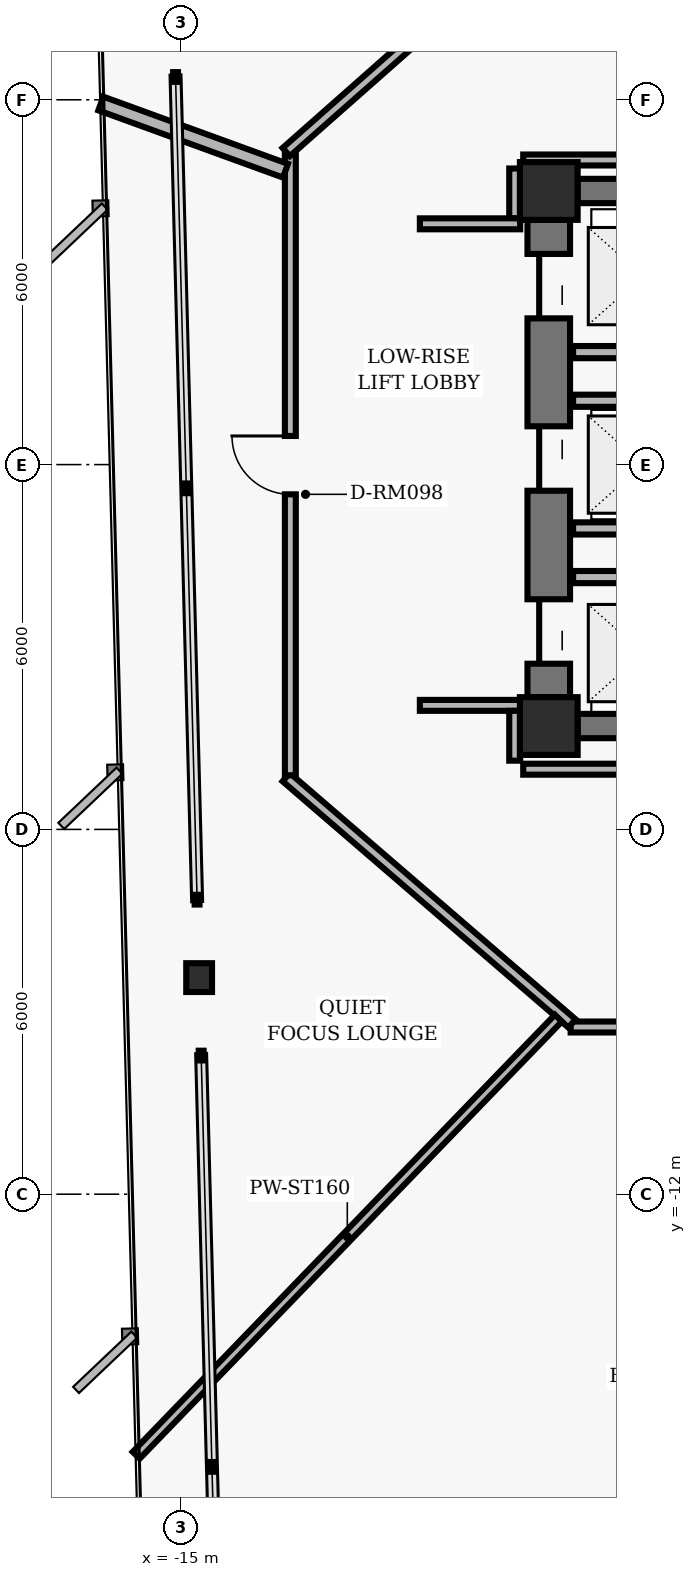
"""IFC4 building model, lengths in metres.
Left out: names, types, materials, properties, quantities, classifications, styles, units other than length and angle.
Written with IfcOpenShell. Run it as: python <this file> out.ifc"""

import sys

from ifc_helpers import new_model, si_unit, direction, frame, frame_2d, origin, origin_2d, place, context, subcontext, project, spatial, rectangle, hollow_rectangle, i_section, extrude, element, fill, save


model = new_model("IFC4")
c1 = context("Model", 3, precision=1e-05, world=origin(), true_north=direction((0.0, 1.0)))
c2 = subcontext(c1, "Body", "Model", "MODEL_VIEW")
j1 = project(units=[si_unit("LENGTHUNIT", "METRE"), si_unit("PLANEANGLEUNIT", "RADIAN")], contexts=[c1])
p1 = place(None, origin())
s1 = spatial("IfcSite", under=j1, at=p1, CompositionType="ELEMENT")
p2 = place(p1, origin())
s2 = spatial("IfcBuilding", under=s1, at=p2, CompositionType="ELEMENT")
p3 = place(p2, frame((0.0, 0.0, 42.4)))
s3 = spatial("IfcBuildingStorey", under=s2, at=p3, CompositionType="ELEMENT", Elevation=42.4)
for number, where, z_axis, x_axis in (
    (1, (-8.95, 4.5, 0.0), (0.0, 0.0, 1.0), (1.0, 0.0, 0.0)),
    (2, (-8.95, -4.3, 0.0), (0.0, 0.0, 1.0), (1.0, 0.0, 0.0)),
):
    element("IfcColumn", number, at=place(p3, frame(where, z_axis=z_axis, x_axis=x_axis)), inside=s3, PredefinedType="COLUMN", context=c2, shape_type="SweptSolid", body=[
        extrude(hollow_rectangle(XDim=0.95, YDim=0.95, WallThickness=0.06, InnerFilletRadius=0.02, OuterFilletRadius=0.04, at=origin_2d()), origin(), (0.0, 0.0, 1.0), 3.36),
    ])
p4 = place(p3, frame((-8.95, -3.825, 0.0), z_axis=(0.0, 0.0, 1.0), x_axis=(0.0, 1.0, 0.0)))
e3 = element("IfcWall", 3, at=p4, inside=s3, PredefinedType="SHEAR", context=c2, shape_type="SweptSolid", body=[
    extrude(rectangle(XDim=7.85, YDim=0.7, at=frame_2d((3.925, 0.0))), origin(), (0.0, 0.0, 1.0), 3.038),
])
p5 = place(p4, frame((0.55, 0.0, 0.0)))
e4 = element("IfcOpeningElement", 4, at=p5, cuts=e3, PredefinedType="OPENING", context=c2, shape_type="SweptSolid", body=[
    extrude(rectangle(XDim=1.06, YDim=2.04, at=frame_2d((0.53, 1.02))), frame((0.0, 0.36, 0.0), z_axis=(0.0, -1.0, 0.0), x_axis=(1.0, 0.0, 0.0)), (0.0, 0.0, 1.0), 0.72),
])
p6 = place(p4, frame((3.395, 0.0, 0.0)))
e5 = element("IfcOpeningElement", 5, at=p6, cuts=e3, PredefinedType="OPENING", context=c2, shape_type="SweptSolid", body=[
    extrude(rectangle(XDim=1.06, YDim=2.04, at=frame_2d((0.53, 1.02))), frame((0.0, 0.36, 0.0), z_axis=(0.0, -1.0, 0.0), x_axis=(1.0, 0.0, 0.0)), (0.0, 0.0, 1.0), 0.72),
])
p7 = place(p4, frame((6.23, 0.0, 0.0)))
e6 = element("IfcOpeningElement", 6, at=p7, cuts=e3, PredefinedType="OPENING", context=c2, shape_type="SweptSolid", body=[
    extrude(rectangle(XDim=1.06, YDim=2.04, at=frame_2d((0.53, 1.02))), frame((0.0, 0.36, 0.0), z_axis=(0.0, -1.0, 0.0), x_axis=(1.0, 0.0, 0.0)), (0.0, 0.0, 1.0), 0.72),
])
for number, where, z_axis, x_axis in (
    (7, (-8.475, 4.5, 0.0), (0.0, 0.0, 1.0), (1.0, 0.0, 0.0)),
    (8, (-8.475, -4.3, 0.0), (0.0, 0.0, 1.0), (1.0, 0.0, 0.0)),
):
    element("IfcWall", number, at=place(p3, frame(where, z_axis=z_axis, x_axis=x_axis)), inside=s3, PredefinedType="SHEAR", context=c2, shape_type="SweptSolid", body=[
        extrude(rectangle(XDim=1.95, YDim=0.4, at=frame_2d((0.975, 0.0))), origin(), (0.0, 0.0, 1.0), 3.038),
    ])
p8 = place(p3, frame((-14.7, -8.438, 0.0), z_axis=(0.0, 0.0, 1.0), x_axis=(1.0, 0.0, 0.0)))
e9 = element("IfcColumn", 9, at=p8, inside=s3, PredefinedType="COLUMN", context=c2, shape_type="SweptSolid", body=[
    extrude(i_section(OverallWidth=0.424, OverallDepth=0.474, WebThickness=0.048, FlangeThickness=0.077, FilletRadius=0.025, at=origin_2d()), origin(), (0.0, 0.0, 1.0), 3.36),
])
for number, where, z_axis, x_axis in (
    (10, (-8.55, -1.85, 0.0), (0.0, 0.0, 1.0), (1.0, 0.0, 0.0)),
    (11, (-8.55, 1.85, 0.0), (0.0, 0.0, 1.0), (1.0, 0.0, 0.0)),
):
    element("IfcWall", number, at=place(p3, frame(where, z_axis=z_axis, x_axis=x_axis)), inside=s3, PredefinedType="PARTITIONING", context=c2, shape_type="SweptSolid", body=[
        extrude(rectangle(XDim=2.1, YDim=0.2, at=frame_2d((1.05, 0.0))), origin(), (0.0, 0.0, 1.0), 3.013),
    ])
for number, where, z_axis, x_axis in (
    (12, (-8.55, -1.05, 0.0), (0.0, 0.0, 1.0), (1.0, 0.0, 0.0)),
    (13, (-8.55, 1.05, 0.0), (0.0, 0.0, 1.0), (1.0, 0.0, 0.0)),
):
    element("IfcWall", number, at=place(p3, frame(where, z_axis=z_axis, x_axis=x_axis)), inside=s3, PredefinedType="PARTITIONING", context=c2, shape_type="SweptSolid", body=[
        extrude(rectangle(XDim=1.91, YDim=0.2, at=frame_2d((0.955, 0.0))), origin(), (0.0, 0.0, 1.0), 3.013),
    ])
p9 = place(p3, frame((8.41, -9.25, 0.0), z_axis=(0.0, 0.0, 1.0), x_axis=(-1.0, 0.0, 0.0)))
e14 = element("IfcWall", 14, at=p9, inside=s3, PredefinedType="PARTITIONING", context=c2, shape_type="SweptSolid", body=[
    extrude(rectangle(XDim=17.0, YDim=0.18, at=frame_2d((8.5, 0.0))), origin(), (0.0, 0.0, 1.0), 2.527),
])
p10 = place(p9, frame((9.399, 0.0, 0.0)))
e15 = element("IfcOpeningElement", 15, at=p10, cuts=e14, PredefinedType="OPENING", context=c2, shape_type="SweptSolid", body=[
    extrude(rectangle(XDim=0.96, YDim=2.02, at=frame_2d((0.48, 1.01))), frame((0.0, 0.1, 0.0), z_axis=(0.0, -1.0, 0.0), x_axis=(1.0, 0.0, 0.0)), (0.0, 0.0, 1.0), 0.2),
])
p11 = place(p3, frame((-8.568, -9.191, 0.0), z_axis=(0.0, 0.0, 1.0), x_axis=(-0.757556899173, 0.652769135694, 0.0)))
e16 = element("IfcWall", 16, at=p11, inside=s3, PredefinedType="PARTITIONING", context=c2, shape_type="SweptSolid", body=[
    extrude(rectangle(XDim=6.204, YDim=0.18, at=frame_2d((3.102, 0.0))), origin(), (0.0, 0.0, 1.0), 3.013),
])
p12 = place(p3, frame((-13.2, -5.11, 0.0), z_axis=(0.0, 0.0, 1.0), x_axis=(0.0, 1.0, 0.0)))
e17 = element("IfcWall", 17, at=p12, inside=s3, PredefinedType="PARTITIONING", context=c2, shape_type="SweptSolid", body=[
    extrude(rectangle(XDim=10.22, YDim=0.18, at=frame_2d((5.11, 0.0))), origin(), (0.0, 0.0, 1.0), 2.527),
])
p13 = place(p12, frame((4.621, 0.0, 0.0)))
e18 = element("IfcOpeningElement", 18, at=p13, cuts=e17, PredefinedType="OPENING", context=c2, shape_type="SweptSolid", body=[
    extrude(rectangle(XDim=0.96, YDim=2.02, at=frame_2d((0.48, 1.01))), frame((0.0, 0.1, 0.0), z_axis=(0.0, -1.0, 0.0), x_axis=(1.0, 0.0, 0.0)), (0.0, 0.0, 1.0), 0.2),
])
p14 = place(p3, frame((-13.268, 5.14, 0.0), z_axis=(0.0, 0.0, 1.0), x_axis=(0.749626463267, 0.66186113768, 0.0)))
e19 = element("IfcWall", 19, at=p14, inside=s3, PredefinedType="PARTITIONING", context=c2, shape_type="SweptSolid", body=[
    extrude(rectangle(XDim=6.27, YDim=0.18, at=frame_2d((3.135, 0.0))), origin(), (0.0, 0.0, 1.0), 3.013),
])
p15 = place(p3, frame((-9.51, 4.87, 0.0), z_axis=(0.0, 0.0, 1.0), x_axis=(0.0, -1.0, 0.0)))
e20 = element("IfcWall", 20, at=p15, inside=s3, PredefinedType="PARTITIONING", context=c2, shape_type="SweptSolid", body=[
    extrude(rectangle(XDim=0.82, YDim=0.18, at=frame_2d((0.41, 0.0))), origin(), (0.0, 0.0, 1.0), 3.013),
])
for number, where, z_axis, x_axis in (
    (21, (-9.42, 3.96, 0.0), (0.0, 0.0, 1.0), (-1.0, 0.0, 0.0)),
    (22, (-11.07, -3.96, 0.0), (0.0, 0.0, 1.0), (1.0, 0.0, 0.0)),
):
    element("IfcWall", number, at=place(p3, frame(where, z_axis=z_axis, x_axis=x_axis)), inside=s3, PredefinedType="PARTITIONING", context=c2, shape_type="SweptSolid", body=[
        extrude(rectangle(XDim=1.65, YDim=0.18, at=frame_2d((0.825, 0.0))), origin(), (0.0, 0.0, 1.0), 3.013),
    ])
p16 = place(p3, frame((-9.51, -4.05, 0.0), z_axis=(0.0, 0.0, 1.0), x_axis=(0.0, -1.0, 0.0)))
e23 = element("IfcWall", 23, at=p16, inside=s3, PredefinedType="PARTITIONING", context=c2, shape_type="SweptSolid", body=[
    extrude(rectangle(XDim=0.82, YDim=0.18, at=frame_2d((0.41, 0.0))), origin(), (0.0, 0.0, 1.0), 2.298),
])
p17 = place(p3, frame((-9.37, -5.01, 0.0), z_axis=(0.0, 0.0, 1.0), x_axis=(1.0, 0.0, 0.0)))
e24 = element("IfcWall", 24, at=p17, inside=s3, PredefinedType="PARTITIONING", context=c2, shape_type="SweptSolid", body=[
    extrude(rectangle(XDim=3.34, YDim=0.18, at=frame_2d((1.67, 0.0))), origin(), (0.0, 0.0, 1.0), 3.013),
])
p18 = place(p3, frame((-6.562, 5.01, 0.0), z_axis=(0.0, 0.0, 1.0), x_axis=(-1.0, 0.0, 0.0)))
e25 = element("IfcWall", 25, at=p18, inside=s3, PredefinedType="PARTITIONING", context=c2, shape_type="SweptSolid", body=[
    extrude(rectangle(XDim=2.808, YDim=0.18, at=frame_2d((1.404, 0.0))), origin(), (0.0, 0.0, 1.0), 3.013),
])
p19 = place(p3, frame((-8.792, -9.104, 0.0), z_axis=(0.0, 0.0, 1.0), x_axis=(-0.694663387969, -0.719334954952, 0.0)))
e26 = element("IfcWall", 26, at=p19, inside=s3, PredefinedType="PARTITIONING", context=c2, shape_type="SweptSolid", body=[
    extrude(rectangle(XDim=9.995, YDim=0.16, at=frame_2d((4.997, 0.0))), origin(), (0.0, 0.0, 1.0), 3.013),
])
p20 = place(p3, frame((-13.28, 4.833, 0.0), z_axis=(0.0, 0.0, 1.0), x_axis=(-0.939702957278, 0.341991742712, 0.0)))
e27 = element("IfcWall", 27, at=p20, inside=s3, PredefinedType="PARTITIONING", context=c2, shape_type="SweptSolid", body=[
    extrude(rectangle(XDim=3.232, YDim=0.24, at=frame_2d((1.616, 0.0))), origin(), (0.0, 0.0, 1.0), 3.013),
])
p21 = place(p5, origin())
e28 = element("IfcDoor", 28, at=p21, inside=s3, OperationType="SLIDING_TO_LEFT", PredefinedType="DOOR", context=c2, shape_type="SweptSolid", body=[
    extrude(rectangle(XDim=1.06, YDim=2.04, at=frame_2d((0.53, 1.02))), frame((0.0, 0.025, 0.0), z_axis=(0.0, -1.0, 0.0), x_axis=(1.0, 0.0, 0.0)), (0.0, 0.0, 1.0), 0.05),
])
fill(e4, e28)
p22 = place(p6, origin())
e29 = element("IfcDoor", 29, at=p22, inside=s3, OperationType="SLIDING_TO_RIGHT", PredefinedType="DOOR", context=c2, shape_type="SweptSolid", body=[
    extrude(rectangle(XDim=1.06, YDim=2.04, at=frame_2d((0.53, 1.02))), frame((0.0, 0.025, 0.0), z_axis=(0.0, -1.0, 0.0), x_axis=(1.0, 0.0, 0.0)), (0.0, 0.0, 1.0), 0.05),
])
fill(e5, e29)
p23 = place(p7, origin())
e30 = element("IfcDoor", 30, at=p23, inside=s3, OperationType="SLIDING_TO_LEFT", PredefinedType="DOOR", context=c2, shape_type="SweptSolid", body=[
    extrude(rectangle(XDim=1.06, YDim=2.04, at=frame_2d((0.53, 1.02))), frame((0.0, 0.025, 0.0), z_axis=(0.0, -1.0, 0.0), x_axis=(1.0, 0.0, 0.0)), (0.0, 0.0, 1.0), 0.05),
])
fill(e6, e30)
p24 = place(p13, origin())
e31 = element("IfcDoor", 31, at=p24, inside=s3, OperationType="SINGLE_SWING_RIGHT", PredefinedType="DOOR", context=c2, shape_type="SweptSolid", body=[
    extrude(rectangle(XDim=0.96, YDim=2.02, at=frame_2d((0.48, 1.01))), frame((0.0, 0.025, 0.0), z_axis=(0.0, -1.0, 0.0), x_axis=(1.0, 0.0, 0.0)), (0.0, 0.0, 1.0), 0.05),
])
fill(e18, e31)
save(model, sys.argv[1])
